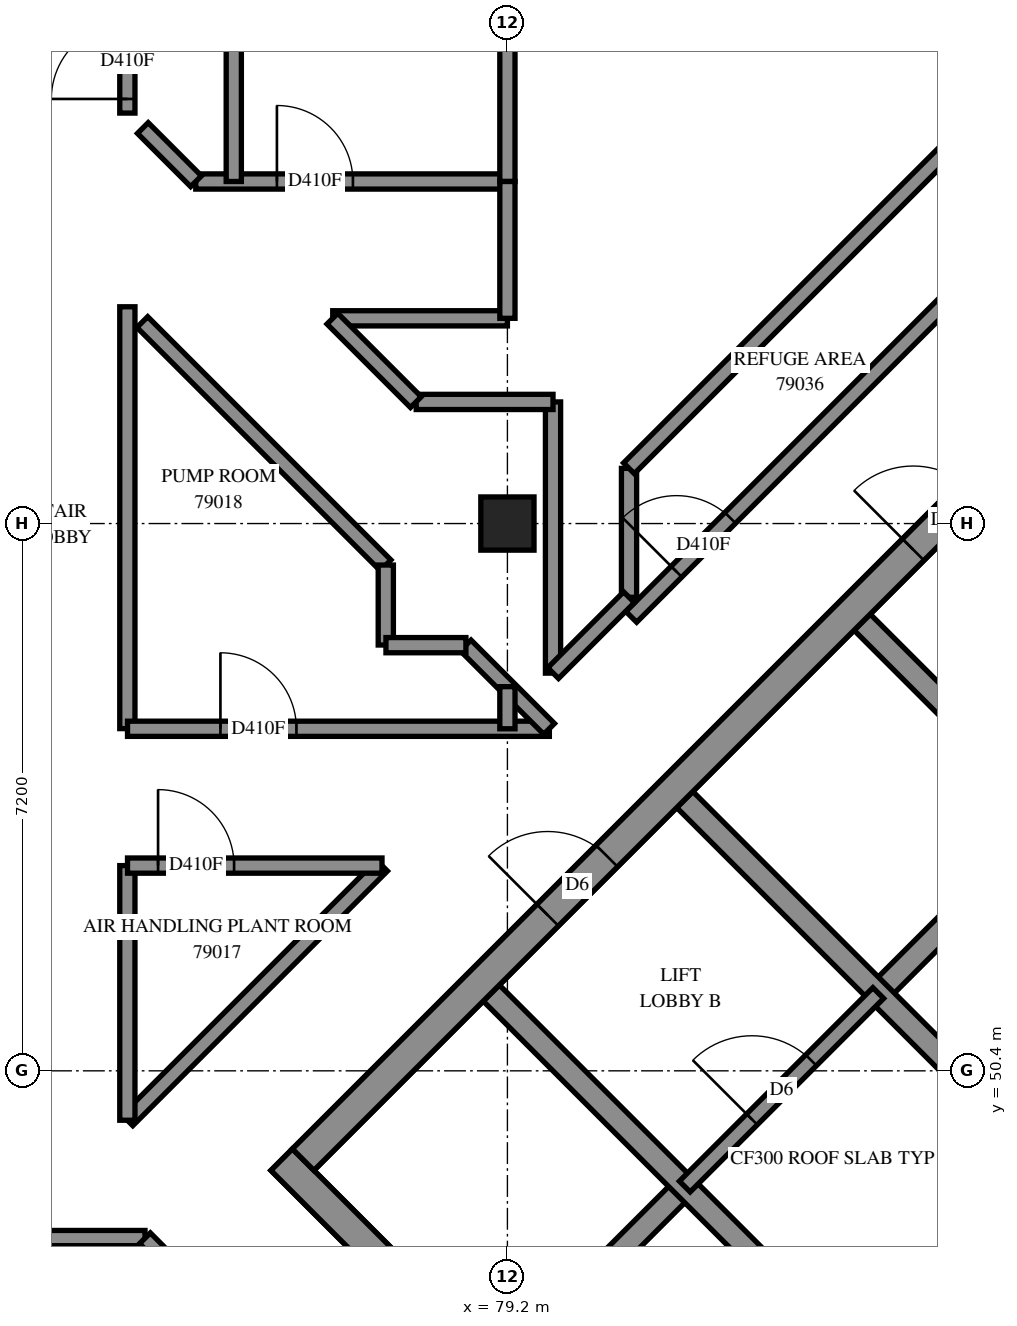
"""IFC4 building model, lengths in metres.
Left out: names, types, materials, properties, quantities, classifications, styles, units other than length and angle.
Written with IfcOpenShell. Run it as: python <this file> out.ifc"""

import sys

from ifc_helpers import new_model, si_unit, direction, frame, frame_2d, origin, origin_2d, place, context, subcontext, project, spatial, polyline, rectangle, outline, extrude, element, fill, save


model = new_model("IFC4")
c1 = context("Model", 3, precision=1e-05, world=origin(), true_north=direction((0.0, 1.0)))
c2 = subcontext(c1, "Body", "Model", "MODEL_VIEW")
j1 = project(units=[si_unit("LENGTHUNIT", "METRE"), si_unit("PLANEANGLEUNIT", "RADIAN")], contexts=[c1])
p1 = place(None, origin())
s1 = spatial("IfcSite", under=j1, at=p1, CompositionType="ELEMENT")
p2 = place(p1, origin())
s2 = spatial("IfcBuilding", under=s1, at=p2, CompositionType="ELEMENT")
p3 = place(p2, frame((0.0, 0.0, 290.6)))
s3 = spatial("IfcBuildingStorey", under=s2, at=p3, CompositionType="ELEMENT", Elevation=290.6)
p4 = place(p3, frame((79.2, 57.6, 0.0), z_axis=(0.0, 0.0, 1.0), x_axis=(1.0, 0.0, 0.0)))
e1 = element("IfcColumn", 1, at=p4, inside=s3, PredefinedType="COLUMN", context=c2, shape_type="SweptSolid", body=[
    extrude(rectangle(XDim=0.7, YDim=0.7, at=origin_2d()), origin(), (0.0, 0.0, 1.0), 3.5),
])
p5 = place(p3, frame((76.23, 49.231, -0.3), z_axis=(0.0, 0.0, 1.0), x_axis=(0.7071034917, -0.7071100706, 0.0)))
e2 = element("IfcWall", 2, at=p5, inside=s3, PredefinedType="SHEAR", context=c2, shape_type="SweptSolid", body=[
    extrude(rectangle(XDim=15.2, YDim=0.4, at=frame_2d((7.6, 0.0))), origin(), (0.0, 0.0, 1.0), 3.1),
])
p6 = place(p3, frame((76.513, 49.231, -0.3), z_axis=(0.0, 0.0, 1.0), x_axis=(0.7071067812, 0.7071067812, 0.0)))
e3 = element("IfcWall", 3, at=p6, inside=s3, PredefinedType="SHEAR", context=c2, shape_type="SweptSolid", body=[
    extrude(rectangle(XDim=14.4, YDim=0.4, at=frame_2d((7.2, 0.0))), origin(), (0.0, 0.0, 1.0), 3.1),
])
p7 = place(p6, frame((4.55, 0.0, 0.3)))
e4 = element("IfcOpeningElement", 4, at=p7, cuts=e3, PredefinedType="OPENING", context=c2, shape_type="SweptSolid", body=[
    extrude(rectangle(XDim=1.1, YDim=2.1, at=frame_2d((0.55, 1.05))), frame((0.0, 0.21, 0.0), z_axis=(0.0, -1.0, 0.0), x_axis=(1.0, 0.0, 0.0)), (0.0, 0.0, 1.0), 0.42),
])
p8 = place(p6, frame((11.35, 0.0, 0.3)))
e5 = element("IfcOpeningElement", 5, at=p8, cuts=e3, PredefinedType="OPENING", context=c2, shape_type="SweptSolid", body=[
    extrude(rectangle(XDim=1.1, YDim=2.1, at=frame_2d((0.55, 1.05))), frame((0.0, 0.21, 0.0), z_axis=(0.0, -1.0, 0.0), x_axis=(1.0, 0.0, 0.0)), (0.0, 0.0, 1.0), 0.42),
])
for number, where, z_axis, x_axis in (
    (6, (79.2, 46.544, 0.0), (0.0, 0.0, 1.0), (0.707, 0.707, 0.0)),
    (7, (84.079, 51.423, 0.0), (0.0, 0.0, 1.0), (0.707, 0.707, 0.0)),
):
    element("IfcWall", number, at=place(p3, frame(where, z_axis=z_axis, x_axis=x_axis)), inside=s3, PredefinedType="SOLIDWALL", context=c2, shape_type="SweptSolid", body=[
        extrude(rectangle(XDim=3.3, YDim=0.3, at=frame_2d((1.65, 0.0))), origin(), (0.0, 0.0, 1.0), 3.5),
    ])
p9 = place(p3, frame((78.988, 51.423, 0.0), z_axis=(0.0, 0.0, 1.0), x_axis=(0.7071067812, -0.7071067812, 0.0)))
e8 = element("IfcWall", 8, at=p9, inside=s3, PredefinedType="SOLIDWALL", context=c2, shape_type="SweptSolid", body=[
    extrude(rectangle(XDim=14.4, YDim=0.3, at=frame_2d((7.2, 0.0))), origin(), (0.0, 0.0, 1.0), 3.5),
])
p10 = place(p9, frame((12.05, 0.0, 0.0)))
e9 = element("IfcOpeningElement", 9, at=p10, cuts=e8, PredefinedType="OPENING", context=c2, shape_type="SweptSolid", body=[
    extrude(rectangle(XDim=1.1, YDim=2.1, at=frame_2d((0.55, 1.05))), frame((0.0, 0.16, 0.0), z_axis=(0.0, -1.0, 0.0), x_axis=(1.0, 0.0, 0.0)), (0.0, 0.0, 1.0), 0.32),
])
p11 = place(p3, frame((81.534, 53.969, 0.0), z_axis=(0.0, 0.0, 1.0), x_axis=(0.707103309, -0.7071102534, 0.0)))
e10 = element("IfcWall", 10, at=p11, inside=s3, PredefinedType="SOLIDWALL", context=c2, shape_type="SweptSolid", body=[
    extrude(rectangle(XDim=14.4, YDim=0.3, at=frame_2d((7.2, 0.0))), origin(), (0.0, 0.0, 1.0), 3.5),
])
p12 = place(p11, frame((12.05, 0.0, 0.0)))
e11 = element("IfcOpeningElement", 11, at=p12, cuts=e10, PredefinedType="OPENING", context=c2, shape_type="SweptSolid", body=[
    extrude(rectangle(XDim=1.1, YDim=2.1, at=frame_2d((0.55, 1.05))), frame((0.0, 0.16, 0.0), z_axis=(0.0, -1.0, 0.0), x_axis=(1.0, 0.0, 0.0)), (0.0, 0.0, 1.0), 0.32),
])
p13 = place(p3, frame((83.867, 56.302, 0.0), z_axis=(0.0, 0.0, 1.0), x_axis=(0.7071137256, -0.7070998367, 0.0)))
e12 = element("IfcWall", 12, at=p13, inside=s3, PredefinedType="SOLIDWALL", context=c2, shape_type="SweptSolid", body=[
    extrude(rectangle(XDim=7.2, YDim=0.3, at=frame_2d((3.6, 0.0))), origin(), (0.0, 0.0, 1.0), 3.5),
])
p14 = place(p3, frame((81.534, 48.878, 0.0), z_axis=(0.0, 0.0, 1.0), x_axis=(0.707092892, 0.7071206701, 0.0)))
e13 = element("IfcWall", 13, at=p14, inside=s3, PredefinedType="PARTITIONING", context=c2, shape_type="SweptSolid", body=[
    extrude(rectangle(XDim=3.6, YDim=0.2, at=frame_2d((1.8, 0.0))), origin(), (0.0, 0.0, 1.0), 3.5),
])
p15 = place(p14, frame((1.25, 0.0, 0.0)))
e14 = element("IfcOpeningElement", 14, at=p15, cuts=e13, PredefinedType="OPENING", context=c2, shape_type="SweptSolid", body=[
    extrude(rectangle(XDim=1.1, YDim=2.1, at=frame_2d((0.55, 1.05))), frame((0.0, 0.11, 0.0), z_axis=(0.0, -1.0, 0.0), x_axis=(1.0, 0.0, 0.0)), (0.0, 0.0, 1.0), 0.22),
])
p16 = place(p3, frame((56.8, 48.2, 0.0), z_axis=(0.0, 0.0, 1.0), x_axis=(1.0, 0.0, 0.0)))
e15 = element("IfcWall", 15, at=p16, inside=s3, PredefinedType="PARTITIONING", context=c2, shape_type="SweptSolid", body=[
    extrude(rectangle(XDim=17.632, YDim=0.2, at=frame_2d((8.816, 0.0))), origin(), (0.0, 0.0, 1.0), 3.5),
])
p17 = place(p16, frame((4.081, 0.0, 0.0)))
e16 = element("IfcOpeningElement", 16, at=p17, cuts=e15, PredefinedType="OPENING", context=c2, shape_type="SweptSolid", body=[
    extrude(rectangle(XDim=1.0, YDim=2.1, at=frame_2d((0.5, 1.05))), frame((0.0, 0.11, 0.0), z_axis=(0.0, -1.0, 0.0), x_axis=(1.0, 0.0, 0.0)), (0.0, 0.0, 1.0), 0.22),
])
p18 = place(p16, frame((11.886, 0.0, 0.0)))
e17 = element("IfcOpeningElement", 17, at=p18, cuts=e15, PredefinedType="OPENING", context=c2, shape_type="SweptSolid", body=[
    extrude(rectangle(XDim=1.0, YDim=2.1, at=frame_2d((0.5, 1.05))), frame((0.0, 0.11, 0.0), z_axis=(0.0, -1.0, 0.0), x_axis=(1.0, 0.0, 0.0)), (0.0, 0.0, 1.0), 0.22),
])
p19 = place(p3, frame((80.83, 56.372, 0.0), z_axis=(0.0, 0.0, 1.0), x_axis=(0.7069890968, 0.707224446, 0.0)))
e18 = element("IfcWall", 18, at=p19, inside=s3, PredefinedType="PARTITIONING", context=c2, shape_type="SweptSolid", body=[
    extrude(rectangle(XDim=8.498, YDim=0.2, at=frame_2d((4.249, 0.0))), origin(), (0.0, 0.0, 1.0), 3.5),
])
p20 = place(p19, frame((0.841, 0.0, 0.0)))
e19 = element("IfcOpeningElement", 19, at=p20, cuts=e18, PredefinedType="OPENING", context=c2, shape_type="SweptSolid", body=[
    extrude(rectangle(XDim=1.0, YDim=2.1, at=frame_2d((0.5, 1.05))), frame((0.0, 0.11, 0.0), z_axis=(0.0, -1.0, 0.0), x_axis=(1.0, 0.0, 0.0)), (0.0, 0.0, 1.0), 0.22),
])
p21 = place(p3, frame((74.2, 54.902, 0.0), z_axis=(0.0, 0.0, 1.0), x_axis=(0.0, 1.0, 0.0)))
e20 = element("IfcWall", 20, at=p21, inside=s3, PredefinedType="PARTITIONING", context=c2, shape_type="SweptSolid", body=[
    extrude(rectangle(XDim=5.55, YDim=0.2, at=frame_2d((2.775, 0.0))), origin(), (0.0, 0.0, 1.0), 3.5),
])
p22 = place(p3, frame((74.202, 54.9, 0.0), z_axis=(0.0, 0.0, 1.0), x_axis=(1.0, 0.0, 0.0)))
e21 = element("IfcWall", 21, at=p22, inside=s3, PredefinedType="PARTITIONING", context=c2, shape_type="SweptSolid", body=[
    extrude(rectangle(XDim=5.55, YDim=0.2, at=frame_2d((2.775, 0.0))), origin(), (0.0, 0.0, 1.0), 3.5),
])
p23 = place(p22, frame((1.222, 0.0, 0.0)))
e22 = element("IfcOpeningElement", 22, at=p23, cuts=e21, PredefinedType="OPENING", context=c2, shape_type="SweptSolid", body=[
    extrude(rectangle(XDim=1.0, YDim=2.1, at=frame_2d((0.5, 1.05))), frame((0.0, 0.11, 0.0), z_axis=(0.0, -1.0, 0.0), x_axis=(1.0, 0.0, 0.0)), (0.0, 0.0, 1.0), 0.22),
])
p24 = place(p3, frame((74.201, 49.749, 0.0), z_axis=(0.0, 0.0, 1.0), x_axis=(0.7071067812, 0.7071067812, 0.0)))
e23 = element("IfcWall", 23, at=p24, inside=s3, PredefinedType="PARTITIONING", context=c2, shape_type="SweptSolid", body=[
    extrude(rectangle(XDim=4.738, YDim=0.2, at=frame_2d((2.369, 0.0))), origin(), (0.0, 0.0, 1.0), 3.5),
])
p25 = place(p3, frame((74.397, 60.251, 0.0), z_axis=(0.0, 0.0, 1.0), x_axis=(0.7071067812, -0.7071067812, 0.0)))
e24 = element("IfcWall", 24, at=p25, inside=s3, PredefinedType="PARTITIONING", context=c2, shape_type="SweptSolid", body=[
    extrude(rectangle(XDim=4.526, YDim=0.2, at=frame_2d((2.263, 0.0))), origin(), (0.0, 0.0, 1.0), 3.5),
])
p26 = place(p3, frame((75.1, 62.1, 0.0), z_axis=(0.0, 0.0, 1.0), x_axis=(1.0, 0.0, 0.0)))
e25 = element("IfcWall", 25, at=p26, inside=s3, PredefinedType="PARTITIONING", context=c2, shape_type="SweptSolid", body=[
    extrude(rectangle(XDim=4.1, YDim=0.2, at=frame_2d((2.05, 0.0))), origin(), (0.0, 0.0, 1.0), 3.5),
])
p27 = place(p26, frame((1.067, 0.0, 0.0)))
e26 = element("IfcOpeningElement", 26, at=p27, cuts=e25, PredefinedType="OPENING", context=c2, shape_type="SweptSolid", body=[
    extrude(rectangle(XDim=1.0, YDim=2.1, at=frame_2d((0.5, 1.05))), frame((0.0, 0.11, 0.0), z_axis=(0.0, -1.0, 0.0), x_axis=(1.0, 0.0, 0.0)), (0.0, 0.0, 1.0), 0.22),
])
p28 = place(p3, frame((74.2, 63.0, 0.0), z_axis=(0.0, 0.0, 1.0), x_axis=(0.0, 1.0, 0.0)))
e27 = element("IfcWall", 27, at=p28, inside=s3, PredefinedType="PARTITIONING", context=c2, shape_type="SweptSolid", body=[
    extrude(rectangle(XDim=4.0, YDim=0.2, at=frame_2d((2.0, 0.0))), origin(), (0.0, 0.0, 1.0), 3.5),
])
p29 = place(p28, frame((0.186, 0.0, 0.0)))
e28 = element("IfcOpeningElement", 28, at=p29, cuts=e27, PredefinedType="OPENING", context=c2, shape_type="SweptSolid", body=[
    extrude(rectangle(XDim=1.0, YDim=2.1, at=frame_2d((0.5, 1.05))), frame((0.0, 0.11, 0.0), z_axis=(0.0, -1.0, 0.0), x_axis=(1.0, 0.0, 0.0)), (0.0, 0.0, 1.0), 0.22),
])
p30 = place(p3, frame((79.8, 55.632, 0.0), z_axis=(0.0, 0.0, 1.0), x_axis=(0.0, 1.0, 0.0)))
e29 = element("IfcWall", 29, at=p30, inside=s3, PredefinedType="PARTITIONING", context=c2, shape_type="SweptSolid", body=[
    extrude(rectangle(XDim=3.568, YDim=0.2, at=frame_2d((1.784, 0.0))), origin(), (0.0, 0.0, 1.0), 3.5),
])
p31 = place(p3, frame((74.2, 49.75, 0.0), z_axis=(0.0, 0.0, 1.0), x_axis=(0.0, 1.0, 0.0)))
e30 = element("IfcWall", 30, at=p31, inside=s3, PredefinedType="PARTITIONING", context=c2, shape_type="SweptSolid", body=[
    extrude(rectangle(XDim=3.35, YDim=0.2, at=frame_2d((1.675, 0.0))), origin(), (0.0, 0.0, 1.0), 3.5),
])
p32 = place(p3, frame((74.202, 53.1, 0.0), z_axis=(0.0, 0.0, 1.0), x_axis=(1.0, 0.0, 0.0)))
e31 = element("IfcWall", 31, at=p32, inside=s3, PredefinedType="PARTITIONING", context=c2, shape_type="SweptSolid", body=[
    extrude(rectangle(XDim=3.348, YDim=0.2, at=frame_2d((1.674, 0.0))), origin(), (0.0, 0.0, 1.0), 3.5),
])
p33 = place(p32, frame((0.402, 0.0, 0.0)))
e32 = element("IfcOpeningElement", 32, at=p33, cuts=e31, PredefinedType="OPENING", context=c2, shape_type="SweptSolid", body=[
    extrude(rectangle(XDim=1.0, YDim=2.1, at=frame_2d((0.5, 1.05))), frame((0.0, 0.11, 0.0), z_axis=(0.0, -1.0, 0.0), x_axis=(1.0, 0.0, 0.0)), (0.0, 0.0, 1.0), 0.22),
])
p34 = place(p3, frame((79.2, 62.1, 0.0), z_axis=(0.0, 0.0, 1.0), x_axis=(0.0, 1.0, 0.0)))
e33 = element("IfcWall", 33, at=p34, inside=s3, PredefinedType="PARTITIONING", context=c2, shape_type="SweptSolid", body=[
    extrude(rectangle(XDim=2.35, YDim=0.2, at=frame_2d((1.175, 0.0))), origin(), (0.0, 0.0, 1.0), 3.5),
])
p35 = place(p3, frame((76.902, 60.3, 0.0), z_axis=(0.0, 0.0, 1.0), x_axis=(1.0, 0.0, 0.0)))
e34 = element("IfcWall", 34, at=p35, inside=s3, PredefinedType="PARTITIONING", context=c2, shape_type="SweptSolid", body=[
    extrude(rectangle(XDim=2.298, YDim=0.2, at=frame_2d((1.149, 0.0))), origin(), (0.0, 0.0, 1.0), 3.5),
])
for number, where, z_axis, x_axis in (
    (35, (79.2, 60.3, 0.0), (0.0, 0.0, 1.0), (0.0, 1.0, 0.0)),
    (36, (78.0, 59.2, 0.0), (0.0, 0.0, 1.0), (1.0, 0.0, 0.0)),
):
    element("IfcWall", number, at=place(p3, frame(where, z_axis=z_axis, x_axis=x_axis)), inside=s3, PredefinedType="PARTITIONING", context=c2, shape_type="SweptSolid", body=[
        extrude(rectangle(XDim=1.8, YDim=0.2, at=frame_2d((0.9, 0.0))), origin(), (0.0, 0.0, 1.0), 3.5),
    ])
p36 = place(p3, frame((80.8, 56.63, 0.0), z_axis=(0.0, 0.0, 1.0), x_axis=(0.0, 1.0, 0.0)))
e37 = element("IfcWall", 37, at=p36, inside=s3, PredefinedType="PARTITIONING", context=c2, shape_type="SweptSolid", body=[
    extrude(rectangle(XDim=1.696, YDim=0.2, at=frame_2d((0.848, 0.0))), origin(), (0.0, 0.0, 1.0), 3.5),
])
for number, where, z_axis, x_axis in (
    (38, (76.897, 60.295, 0.0), (0.0, 0.0, 1.0), (0.707, -0.707, 0.0)),
    (39, (78.651, 55.997, 0.0), (0.0, 0.0, 1.0), (0.707, -0.707, 0.0)),
):
    element("IfcWall", number, at=place(p3, frame(where, z_axis=z_axis, x_axis=x_axis)), inside=s3, PredefinedType="PARTITIONING", context=c2, shape_type="SweptSolid", body=[
        extrude(rectangle(XDim=1.553, YDim=0.2, at=frame_2d((0.776, 0.0))), origin(), (0.0, 0.0, 1.0), 3.5),
    ])
p37 = place(p3, frame((79.802, 55.633, 0.0), z_axis=(0.0, 0.0, 1.0), x_axis=(0.7071067812, 0.7071067812, 0.0)))
e40 = element("IfcWall", 40, at=p37, inside=s3, PredefinedType="PARTITIONING", context=c2, shape_type="SweptSolid", body=[
    extrude(rectangle(XDim=1.411, YDim=0.2, at=frame_2d((0.706, 0.0))), origin(), (0.0, 0.0, 1.0), 3.5),
])
for number, where, z_axis, x_axis in (
    (41, (77.6, 56.002, 0.0), (0.0, 0.0, 1.0), (0.0, 1.0, 0.0)),
    (42, (77.602, 56.0, 0.0), (0.0, 0.0, 1.0), (1.0, 0.0, 0.0)),
):
    element("IfcWall", number, at=place(p3, frame(where, z_axis=z_axis, x_axis=x_axis)), inside=s3, PredefinedType="PARTITIONING", context=c2, shape_type="SweptSolid", body=[
        extrude(rectangle(XDim=1.052, YDim=0.2, at=frame_2d((0.526, 0.0))), origin(), (0.0, 0.0, 1.0), 3.5),
    ])
p38 = place(p3, frame((74.403, 62.803, 0.0), z_axis=(0.0, 0.0, 1.0), x_axis=(0.7071067812, -0.7071067812, 0.0)))
e43 = element("IfcWall", 43, at=p38, inside=s3, PredefinedType="PARTITIONING", context=c2, shape_type="SweptSolid", body=[
    extrude(rectangle(XDim=0.99, YDim=0.2, at=frame_2d((0.495, 0.0))), origin(), (0.0, 0.0, 1.0), 3.5),
])
p39 = place(p3, frame((79.2, 54.9, 0.0), z_axis=(0.0, 0.0, 1.0), x_axis=(0.0, 1.0, 0.0)))
e44 = element("IfcWall", 44, at=p39, inside=s3, PredefinedType="PARTITIONING", context=c2, shape_type="SweptSolid", body=[
    extrude(rectangle(XDim=0.554, YDim=0.2, at=frame_2d((0.277, 0.0))), origin(), (0.0, 0.0, 1.0), 3.5),
])
p40 = place(p3, frame((74.431, 48.198, 0.0), z_axis=(0.0, 0.0, 1.0), x_axis=(0.7052581455, -0.7089505965, 0.0)))
e45 = element("IfcWall", 45, at=p40, inside=s3, PredefinedType="PARTITIONING", context=c2, shape_type="SweptSolid", body=[
    extrude(rectangle(XDim=0.542, YDim=0.2, at=frame_2d((0.271, 0.0))), origin(), (0.0, 0.0, 1.0), 3.5),
])
p41 = place(p3, frame((75.6, 62.1, 0.0), z_axis=(0.0, 0.0, 1.0), x_axis=(0.0, 1.0, 0.0)))
e46 = element("IfcWall", 46, at=p41, inside=s3, PredefinedType="PARTITIONING", context=c2, shape_type="SweptSolid", body=[
    extrude(outline(polyline([(0.0, -0.1), (10.7, -0.1), (10.7, 0.1), (0.0, 0.1), (0.0, -0.1)])), origin(), (0.0, 0.0, 1.0), 3.5),
])
p42 = place(p3, frame((80.799, 58.327, 0.0), z_axis=(0.0, 0.0, 1.0), x_axis=(0.7071067812, 0.7071067812, 0.0)))
e47 = element("IfcWall", 47, at=p42, inside=s3, PredefinedType="PARTITIONING", context=c2, shape_type="SweptSolid", body=[
    extrude(outline(polyline([(0.0, -0.1), (9.338, -0.1), (9.338, 0.1), (0.0, 0.1), (0.0, -0.1)])), origin(), (0.0, 0.0, 1.0), 3.5),
])
p43 = place(p7, origin())
e48 = element("IfcDoor", 48, at=p43, inside=s3, OperationType="DOUBLE_DOOR_SINGLE_SWING", PredefinedType="DOOR", context=c2, shape_type="SweptSolid", body=[
    extrude(rectangle(XDim=1.1, YDim=2.1, at=frame_2d((0.55, 1.05))), frame((0.0, 0.025, 0.0), z_axis=(0.0, -1.0, 0.0), x_axis=(1.0, 0.0, 0.0)), (0.0, 0.0, 1.0), 0.05),
])
fill(e4, e48)
p44 = place(p8, origin())
e49 = element("IfcDoor", 49, at=p44, inside=s3, OperationType="SINGLE_SWING_LEFT", PredefinedType="DOOR", context=c2, shape_type="SweptSolid", body=[
    extrude(rectangle(XDim=1.1, YDim=2.1, at=frame_2d((0.55, 1.05))), frame((0.0, 0.025, 0.0), z_axis=(0.0, -1.0, 0.0), x_axis=(1.0, 0.0, 0.0)), (0.0, 0.0, 1.0), 0.05),
])
fill(e5, e49)
p45 = place(p15, origin())
e50 = element("IfcDoor", 50, at=p45, inside=s3, OperationType="DOUBLE_DOOR_SINGLE_SWING", PredefinedType="DOOR", context=c2, shape_type="SweptSolid", body=[
    extrude(rectangle(XDim=1.1, YDim=2.1, at=frame_2d((0.55, 1.05))), frame((0.0, 0.025, 0.0), z_axis=(0.0, -1.0, 0.0), x_axis=(1.0, 0.0, 0.0)), (0.0, 0.0, 1.0), 0.05),
])
fill(e14, e50)
p46 = place(p33, origin())
e51 = element("IfcDoor", 51, at=p46, inside=s3, OperationType="SINGLE_SWING_RIGHT", PredefinedType="DOOR", context=c2, shape_type="SweptSolid", body=[
    extrude(rectangle(XDim=1.0, YDim=2.1, at=frame_2d((0.5, 1.05))), frame((0.0, 0.025, 0.0), z_axis=(0.0, -1.0, 0.0), x_axis=(1.0, 0.0, 0.0)), (0.0, 0.0, 1.0), 0.05),
])
fill(e32, e51)
p47 = place(p23, origin())
e52 = element("IfcDoor", 52, at=p47, inside=s3, OperationType="SINGLE_SWING_LEFT", PredefinedType="DOOR", context=c2, shape_type="SweptSolid", body=[
    extrude(rectangle(XDim=1.0, YDim=2.1, at=frame_2d((0.5, 1.05))), frame((0.0, 0.025, 0.0), z_axis=(0.0, -1.0, 0.0), x_axis=(1.0, 0.0, 0.0)), (0.0, 0.0, 1.0), 0.05),
])
fill(e22, e52)
p48 = place(p29, origin())
e53 = element("IfcDoor", 53, at=p48, inside=s3, OperationType="SINGLE_SWING_RIGHT", PredefinedType="DOOR", context=c2, shape_type="SweptSolid", body=[
    extrude(rectangle(XDim=1.0, YDim=2.1, at=frame_2d((0.5, 1.05))), frame((0.0, 0.025, 0.0), z_axis=(0.0, -1.0, 0.0), x_axis=(1.0, 0.0, 0.0)), (0.0, 0.0, 1.0), 0.05),
])
fill(e28, e53)
p49 = place(p27, origin())
e54 = element("IfcDoor", 54, at=p49, inside=s3, OperationType="SINGLE_SWING_LEFT", PredefinedType="DOOR", context=c2, shape_type="SweptSolid", body=[
    extrude(rectangle(XDim=1.0, YDim=2.1, at=frame_2d((0.5, 1.05))), frame((0.0, 0.025, 0.0), z_axis=(0.0, -1.0, 0.0), x_axis=(1.0, 0.0, 0.0)), (0.0, 0.0, 1.0), 0.05),
])
fill(e26, e54)
p50 = place(p20, origin())
e55 = element("IfcDoor", 55, at=p50, inside=s3, OperationType="SINGLE_SWING_RIGHT", PredefinedType="DOOR", context=c2, shape_type="SweptSolid", body=[
    extrude(rectangle(XDim=1.0, YDim=2.1, at=frame_2d((0.5, 1.05))), frame((0.0, 0.025, 0.0), z_axis=(0.0, -1.0, 0.0), x_axis=(1.0, 0.0, 0.0)), (0.0, 0.0, 1.0), 0.05),
])
fill(e19, e55)
save(model, sys.argv[1])
